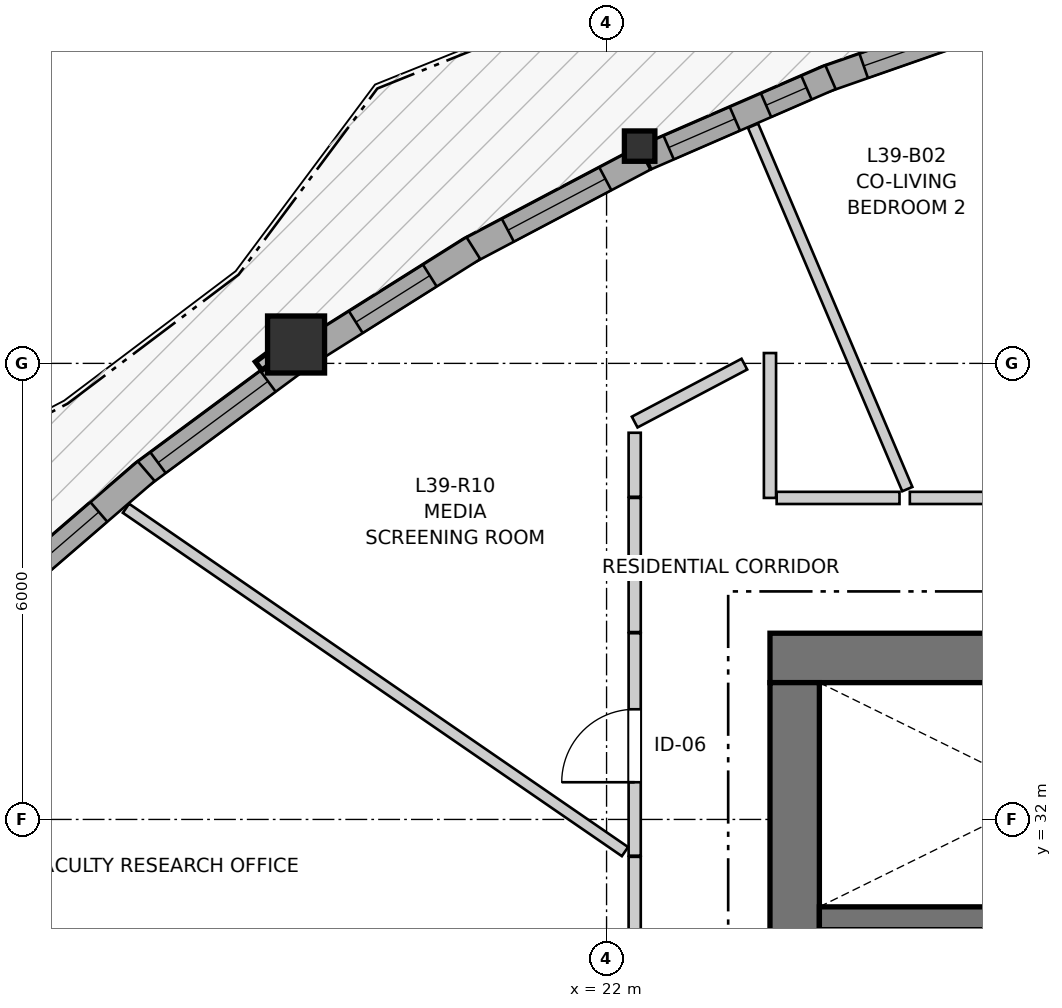
"""IFC4 building model, lengths in metres.
Left out: names, types, materials, properties, quantities, classifications, styles, units other than length and angle.
Written with IfcOpenShell. Run it as: python <this file> out.ifc"""

import sys

from ifc_helpers import new_model, si_unit, direction, frame, frame_2d, origin, origin_2d, place, context, subcontext, project, spatial, rectangle, i_section, extrude, source, transform, mapped, element, fill, save


model = new_model("IFC4")
c1 = context("Model", 3, precision=1e-05, world=origin(), true_north=direction((0.0, 1.0)))
c2 = subcontext(c1, "Body", "Model", "MODEL_VIEW")
j1 = project(units=[si_unit("LENGTHUNIT", "METRE"), si_unit("PLANEANGLEUNIT", "RADIAN")], contexts=[c1])
p1 = place(None, origin())
s1 = spatial("IfcSite", under=j1, at=p1, CompositionType="ELEMENT")
p2 = place(p1, origin())
s2 = spatial("IfcBuilding", under=s1, at=p2, CompositionType="ELEMENT")
p3 = place(p2, frame((0.0, 0.0, 133.0)))
s3 = spatial("IfcBuildingStorey", under=s2, at=p3, CompositionType="ELEMENT", Elevation=133.0)
p4 = place(p3, frame((36.55, 34.125, 0.0), z_axis=(0.0, 0.0, 1.0), x_axis=(-1.0, 0.0, 0.0)))
e1 = element("IfcWall", 1, at=p4, inside=s3, PredefinedType="SHEAR", context=c2, shape_type="SweptSolid", body=[
    extrude(rectangle(XDim=12.4, YDim=0.65, at=frame_2d((6.2, 0.0))), origin(), (0.0, 0.0, 1.0), 2.95),
])
p5 = place(p3, frame((24.475, 33.8, 0.0), z_axis=(0.0, 0.0, 1.0), x_axis=(0.0, -1.0, 0.0)))
e2 = element("IfcWall", 2, at=p5, inside=s3, PredefinedType="SHEAR", context=c2, shape_type="SweptSolid", body=[
    extrude(rectangle(XDim=15.6, YDim=0.65, at=frame_2d((7.8, 0.0))), origin(), (0.0, 0.0, 1.0), 2.95),
])
p6 = place(p5, frame((7.05, 0.0, 0.0)))
e3 = element("IfcOpeningElement", 3, at=p6, cuts=e2, PredefinedType="OPENING", context=c2, shape_type="SweptSolid", body=[
    extrude(rectangle(XDim=1.5, YDim=2.15, at=frame_2d((0.75, 1.075))), frame((0.0, 0.335, 0.0), z_axis=(0.0, -1.0, 0.0), x_axis=(1.0, 0.0, 0.0)), (0.0, 0.0, 1.0), 0.67),
])
p7 = place(p5, frame((3.52, 0.0, 0.0)))
e4 = element("IfcOpeningElement", 4, at=p7, cuts=e2, PredefinedType="OPENING", context=c2, shape_type="SweptSolid", body=[
    extrude(rectangle(XDim=0.86, YDim=2.05, at=frame_2d((0.43, 1.025))), frame((0.0, 0.335, 0.0), z_axis=(0.0, -1.0, 0.0), x_axis=(1.0, 0.0, 0.0)), (0.0, 0.0, 1.0), 0.67),
])
p8 = place(p5, frame((11.22, 0.0, 0.0)))
e5 = element("IfcOpeningElement", 5, at=p8, cuts=e2, PredefinedType="OPENING", context=c2, shape_type="SweptSolid", body=[
    extrude(rectangle(XDim=0.86, YDim=2.05, at=frame_2d((0.43, 1.025))), frame((0.0, 0.335, 0.0), z_axis=(0.0, -1.0, 0.0), x_axis=(1.0, 0.0, 0.0)), (0.0, 0.0, 1.0), 0.67),
])
p9 = place(p3, frame((24.8, 30.7, 0.0), z_axis=(0.0, 0.0, 1.0), x_axis=(1.0, 0.0, 0.0)))
e6 = element("IfcWall", 6, at=p9, inside=s3, PredefinedType="SHEAR", context=c2, shape_type="SweptSolid", body=[
    extrude(rectangle(XDim=11.1, YDim=0.3, at=frame_2d((5.55, 0.0))), origin(), (0.0, 0.0, 1.0), 2.95),
])
p10 = place(p9, frame((6.22, 0.0, 0.0)))
e7 = element("IfcOpeningElement", 7, at=p10, cuts=e6, PredefinedType="OPENING", context=c2, shape_type="SweptSolid", body=[
    extrude(rectangle(XDim=0.98, YDim=2.15, at=frame_2d((0.49, 1.075))), frame((0.0, 0.16, 0.0), z_axis=(0.0, -1.0, 0.0), x_axis=(1.0, 0.0, 0.0)), (0.0, 0.0, 1.0), 0.32),
])
p11 = place(p9, frame((9.15, 0.0, 0.0)))
e8 = element("IfcOpeningElement", 8, at=p11, cuts=e6, PredefinedType="OPENING", context=c2, shape_type="SweptSolid", body=[
    extrude(rectangle(XDim=1.15, YDim=2.15, at=frame_2d((0.575, 1.075))), frame((0.0, 0.16, 0.0), z_axis=(0.0, -1.0, 0.0), x_axis=(1.0, 0.0, 0.0)), (0.0, 0.0, 1.0), 0.32),
])
m1 = source(origin(), c2, "Body", "SweptSolid", [
    extrude(i_section(OverallWidth=0.401, OverallDepth=0.399, WebThickness=0.023, FlangeThickness=0.036, FilletRadius=0.015, at=origin_2d()), origin(), (0.0, 0.0, 1.0), 2.95),
])
p12 = place(p3, frame((22.435, 40.858, 0.0), z_axis=(0.0, 0.0, 1.0), x_axis=(1.0, 0.0, 0.0)))
e9 = element("IfcColumn", 9, at=p12, inside=s3, PredefinedType="PILASTER", context=c2, shape_type="MappedRepresentation", body=[
    mapped(m1, transform((0.0, 0.0, 0.0), x_axis=(1.0, 0.0, 0.0), y_axis=(0.0, 1.0, 0.0), z_axis=(0.0, 0.0, 1.0), scale=1.0)),
])
m2 = source(origin(), c2, "Body", "SweptSolid", [
    extrude(rectangle(XDim=0.75, YDim=0.75, at=origin_2d()), origin(), (0.0, 0.0, 1.0), 2.95),
])
p13 = place(p3, frame((17.915, 38.249, 0.0), z_axis=(0.0, 0.0, 1.0), x_axis=(1.0, 0.0, 0.0)))
e10 = element("IfcColumn", 10, at=p13, inside=s3, PredefinedType="COLUMN", context=c2, shape_type="MappedRepresentation", body=[
    mapped(m2, transform((0.0, 0.0, 0.0), x_axis=(1.0, 0.0, 0.0), y_axis=(0.0, 1.0, 0.0), z_axis=(0.0, 0.0, 1.0), scale=1.0)),
])
p14 = place(p3, frame((27.262, 42.57, 0.0), z_axis=(0.0, 0.0, 1.0), x_axis=(-0.944148723561, -0.329519631884, 0.0)))
e11 = element("IfcWall", 11, at=p14, inside=s3, PredefinedType="SOLIDWALL", context=c2, shape_type="SweptSolid", body=[
    extrude(rectangle(XDim=2.54, YDim=0.34, at=frame_2d((1.27, 0.0))), origin(), (0.0, 0.0, 1.0), 2.53),
])
p15 = place(p14, frame((0.54, 0.0, 0.82)))
e12 = element("IfcOpeningElement", 12, at=p15, cuts=e11, PredefinedType="OPENING", context=c2, shape_type="SweptSolid", body=[
    extrude(rectangle(XDim=1.45, YDim=1.25, at=frame_2d((0.725, 0.625))), frame((0.0, 0.18, 0.0), z_axis=(0.0, -1.0, 0.0), x_axis=(1.0, 0.0, 0.0)), (0.0, 0.0, 1.0), 0.36),
])
p16 = place(p3, frame((24.947, 41.765, 0.0), z_axis=(0.0, 0.0, 1.0), x_axis=(-0.917074459221, -0.398715984435, 0.0)))
e13 = element("IfcWall", 13, at=p16, inside=s3, PredefinedType="SOLIDWALL", context=c2, shape_type="SweptSolid", body=[
    extrude(rectangle(XDim=2.645, YDim=0.34, at=frame_2d((1.322, 0.0))), origin(), (0.0, 0.0, 1.0), 2.53),
])
p17 = place(p16, frame((0.344, 0.0, 0.82)))
e14 = element("IfcOpeningElement", 14, at=p17, cuts=e13, PredefinedType="OPENING", context=c2, shape_type="SweptSolid", body=[
    extrude(rectangle(XDim=0.58, YDim=1.35, at=frame_2d((0.29, 0.675))), frame((0.0, 0.18, 0.0), z_axis=(0.0, -1.0, 0.0), x_axis=(1.0, 0.0, 0.0)), (0.0, 0.0, 1.0), 0.36),
])
p18 = place(p16, frame((1.372, 0.0, 0.82)))
e15 = element("IfcOpeningElement", 15, at=p18, cuts=e13, PredefinedType="OPENING", context=c2, shape_type="SweptSolid", body=[
    extrude(rectangle(XDim=0.95, YDim=1.35, at=frame_2d((0.475, 0.675))), frame((0.0, 0.18, 0.0), z_axis=(0.0, -1.0, 0.0), x_axis=(1.0, 0.0, 0.0)), (0.0, 0.0, 1.0), 0.36),
])
p19 = place(p3, frame((22.497, 40.699, 0.0), z_axis=(0.0, 0.0, 1.0), x_axis=(-0.88439007496, -0.466748535415, 0.0)))
e16 = element("IfcWall", 16, at=p19, inside=s3, PredefinedType="SOLIDWALL", context=c2, shape_type="SweptSolid", body=[
    extrude(rectangle(XDim=2.63, YDim=0.34, at=frame_2d((1.315, 0.0))), origin(), (0.0, 0.0, 1.0), 2.53),
])
p20 = place(p19, frame((0.58, 0.0, 0.82)))
e17 = element("IfcOpeningElement", 17, at=p20, cuts=e16, PredefinedType="OPENING", context=c2, shape_type="SweptSolid", body=[
    extrude(rectangle(XDim=1.45, YDim=1.25, at=frame_2d((0.725, 0.625))), frame((0.0, 0.18, 0.0), z_axis=(0.0, -1.0, 0.0), x_axis=(1.0, 0.0, 0.0)), (0.0, 0.0, 1.0), 0.36),
])
p21 = place(p3, frame((20.248, 39.516, 0.0), z_axis=(0.0, 0.0, 1.0), x_axis=(-0.846438698205, -0.532486178394, 0.0)))
e18 = element("IfcWall", 18, at=p21, inside=s3, PredefinedType="SOLIDWALL", context=c2, shape_type="SweptSolid", body=[
    extrude(rectangle(XDim=2.495, YDim=0.34, at=frame_2d((1.247, 0.0))), origin(), (0.0, 0.0, 1.0), 2.53),
])
p22 = place(p21, frame((0.677, 0.0, 0.82)))
e19 = element("IfcOpeningElement", 19, at=p22, cuts=e18, PredefinedType="OPENING", context=c2, shape_type="SweptSolid", body=[
    extrude(rectangle(XDim=1.15, YDim=1.2, at=frame_2d((0.575, 0.6))), frame((0.0, 0.18, 0.0), z_axis=(0.0, -1.0, 0.0), x_axis=(1.0, 0.0, 0.0)), (0.0, 0.0, 1.0), 0.36),
])
p23 = place(p3, frame((17.891, 38.02, 0.0), z_axis=(0.0, 0.0, 1.0), x_axis=(-0.803824223013, -0.594866891411, 0.0)))
e20 = element("IfcWall", 20, at=p23, inside=s3, PredefinedType="SOLIDWALL", context=c2, shape_type="SweptSolid", body=[
    extrude(rectangle(XDim=2.51, YDim=0.34, at=frame_2d((1.255, 0.0))), origin(), (0.0, 0.0, 1.0), 2.53),
])
p24 = place(p23, frame((0.43, 0.0, 0.82)))
e21 = element("IfcOpeningElement", 21, at=p24, cuts=e20, PredefinedType="OPENING", context=c2, shape_type="SweptSolid", body=[
    extrude(rectangle(XDim=1.8, YDim=1.45, at=frame_2d((0.9, 0.725))), frame((0.0, 0.18, 0.0), z_axis=(0.0, -1.0, 0.0), x_axis=(1.0, 0.0, 0.0)), (0.0, 0.0, 1.0), 0.36),
])
p25 = place(p3, frame((15.943, 36.582, 0.0), z_axis=(0.0, 0.0, 1.0), x_axis=(-0.757520482063, -0.652811396389, 0.0)))
e22 = element("IfcWall", 22, at=p25, inside=s3, PredefinedType="SOLIDWALL", context=c2, shape_type="SweptSolid", body=[
    extrude(rectangle(XDim=2.674, YDim=0.34, at=frame_2d((1.337, 0.0))), origin(), (0.0, 0.0, 1.0), 2.53),
])
p26 = place(p25, frame((0.822, 0.0, 0.82)))
e23 = element("IfcOpeningElement", 23, at=p26, cuts=e22, PredefinedType="OPENING", context=c2, shape_type="SweptSolid", body=[
    extrude(rectangle(XDim=1.5, YDim=1.45, at=frame_2d((0.75, 0.725))), frame((0.0, 0.18, 0.0), z_axis=(0.0, -1.0, 0.0), x_axis=(1.0, 0.0, 0.0)), (0.0, 0.0, 1.0), 0.36),
])
p27 = place(p3, frame((25.99, 36.23, 0.0), z_axis=(0.0, 0.0, 1.0), x_axis=(1.0, 0.0, 0.0)))
e24 = element("IfcWall", 24, at=p27, inside=s3, PredefinedType="PARTITIONING", context=c2, shape_type="SweptSolid", body=[
    extrude(rectangle(XDim=4.073, YDim=0.16, at=frame_2d((2.037, 0.0))), origin(), (0.0, 0.0, 1.0), 2.95),
])
p28 = place(p27, frame((1.6, 0.0, 0.0)))
e25 = element("IfcOpeningElement", 25, at=p28, cuts=e24, PredefinedType="OPENING", context=c2, shape_type="SweptSolid", body=[
    extrude(rectangle(XDim=0.92, YDim=2.1, at=frame_2d((0.46, 1.05))), frame((0.0, 0.09, 0.0), z_axis=(0.0, -1.0, 0.0), x_axis=(1.0, 0.0, 0.0)), (0.0, 0.0, 1.0), 0.18),
])
p29 = place(p3, frame((22.37, 27.85, 0.0), z_axis=(0.0, 0.0, 1.0), x_axis=(0.0, 1.0, 0.0)))
e26 = element("IfcWall", 26, at=p29, inside=s3, PredefinedType="PARTITIONING", context=c2, shape_type="SweptSolid", body=[
    extrude(rectangle(XDim=3.658, YDim=0.16, at=frame_2d((1.829, 0.0))), origin(), (0.0, 0.0, 1.0), 2.95),
])
p30 = place(p29, frame((1.369, 0.0, 0.0)))
e27 = element("IfcOpeningElement", 27, at=p30, cuts=e26, PredefinedType="OPENING", context=c2, shape_type="SweptSolid", body=[
    extrude(rectangle(XDim=0.96, YDim=2.1, at=frame_2d((0.48, 1.05))), frame((0.0, 0.09, 0.0), z_axis=(0.0, -1.0, 0.0), x_axis=(1.0, 0.0, 0.0)), (0.0, 0.0, 1.0), 0.18),
])
p31 = place(p3, frame((22.37, 31.523, 0.0), z_axis=(0.0, 0.0, 1.0), x_axis=(0.0, 1.0, 0.0)))
e28 = element("IfcWall", 28, at=p31, inside=s3, PredefinedType="PARTITIONING", context=c2, shape_type="SweptSolid", body=[
    extrude(rectangle(XDim=2.927, YDim=0.16, at=frame_2d((1.463, 0.0))), origin(), (0.0, 0.0, 1.0), 2.95),
])
p32 = place(p31, frame((0.967, 0.0, 0.0)))
e29 = element("IfcOpeningElement", 29, at=p32, cuts=e28, PredefinedType="OPENING", context=c2, shape_type="SweptSolid", body=[
    extrude(rectangle(XDim=0.96, YDim=2.1, at=frame_2d((0.48, 1.05))), frame((0.0, 0.09, 0.0), z_axis=(0.0, -1.0, 0.0), x_axis=(1.0, 0.0, 0.0)), (0.0, 0.0, 1.0), 0.18),
])
p33 = place(p3, frame((15.677, 36.094, 0.0), z_axis=(0.0, 0.0, 1.0), x_axis=(0.823863992983, -0.566787544911, 0.0)))
e30 = element("IfcWall", 30, at=p33, inside=s3, PredefinedType="PARTITIONING", context=c2, shape_type="SweptSolid", body=[
    extrude(rectangle(XDim=7.969, YDim=0.145, at=frame_2d((3.984, 0.0))), origin(), (0.0, 0.0, 1.0), 2.95),
])
p34 = place(p3, frame((23.927, 41.127, 0.0), z_axis=(0.0, 0.0, 1.0), x_axis=(0.39073452171, -0.920503413108, 0.0)))
e31 = element("IfcWall", 31, at=p34, inside=s3, PredefinedType="PARTITIONING", context=c2, shape_type="SweptSolid", body=[
    extrude(rectangle(XDim=5.194, YDim=0.145, at=frame_2d((2.597, 0.0))), origin(), (0.0, 0.0, 1.0), 2.95),
])
p35 = place(p3, frame((24.15, 36.23, 0.0), z_axis=(0.0, 0.0, 1.0), x_axis=(0.0, 1.0, 0.0)))
e32 = element("IfcWall", 32, at=p35, inside=s3, PredefinedType="PARTITIONING", context=c2, shape_type="SweptSolid", body=[
    extrude(rectangle(XDim=1.906, YDim=0.16, at=frame_2d((0.953, 0.0))), origin(), (0.0, 0.0, 1.0), 2.95),
])
p36 = place(p3, frame((24.238, 36.23, 0.0), z_axis=(0.0, 0.0, 1.0), x_axis=(1.0, 0.0, 0.0)))
e33 = element("IfcWall", 33, at=p36, inside=s3, PredefinedType="PARTITIONING", context=c2, shape_type="SweptSolid", body=[
    extrude(rectangle(XDim=1.616, YDim=0.16, at=frame_2d((0.808, 0.0))), origin(), (0.0, 0.0, 1.0), 2.95),
])
p37 = place(p3, frame((22.37, 34.465, 0.0), z_axis=(0.0, 0.0, 1.0), x_axis=(0.0, 1.0, 0.0)))
e34 = element("IfcWall", 34, at=p37, inside=s3, PredefinedType="PARTITIONING", context=c2, shape_type="SweptSolid", body=[
    extrude(rectangle(XDim=1.765, YDim=0.16, at=frame_2d((0.882, 0.0))), origin(), (0.0, 0.0, 1.0), 2.95),
])
p38 = place(p3, frame((22.37, 37.228, 0.0), z_axis=(0.0, 0.0, 1.0), x_axis=(0.884271493782, 0.466973152638, 0.0)))
e35 = element("IfcWall", 35, at=p38, inside=s3, PredefinedType="PARTITIONING", context=c2, shape_type="SweptSolid", body=[
    extrude(rectangle(XDim=1.632, YDim=0.16, at=frame_2d((0.816, 0.0))), origin(), (0.0, 0.0, 1.0), 2.558),
])
p39 = place(p3, frame((22.37, 36.245, 0.0), z_axis=(0.0, 0.0, 1.0), x_axis=(0.0, 1.0, 0.0)))
e36 = element("IfcWall", 36, at=p39, inside=s3, PredefinedType="PARTITIONING", context=c2, shape_type="SweptSolid", body=[
    extrude(rectangle(XDim=0.842, YDim=0.16, at=frame_2d((0.421, 0.0))), origin(), (0.0, 0.0, 1.0), 2.95),
])
m3 = source(origin(), c2, "Body", "SweptSolid", [
    extrude(rectangle(XDim=1.45, YDim=1.25, at=frame_2d((0.725, 0.625))), frame((0.0, 0.03, 0.0), z_axis=(0.0, -1.0, 0.0), x_axis=(1.0, 0.0, 0.0)), (0.0, 0.0, 1.0), 0.06),
])
p40 = place(p15, origin())
e37 = element("IfcWindow", 37, at=p40, inside=s3, PartitioningType="SINGLE_PANEL", PredefinedType="WINDOW", context=c2, shape_type="MappedRepresentation", body=[
    mapped(m3, transform((0.0, 0.0, 0.0), x_axis=(1.0, 0.0, 0.0), y_axis=(0.0, 1.0, 0.0), z_axis=(0.0, 0.0, 1.0), scale=1.0)),
])
fill(e12, e37)
m4 = source(origin(), c2, "Body", "SweptSolid", [
    extrude(rectangle(XDim=0.58, YDim=1.35, at=frame_2d((0.29, 0.675))), frame((0.0, 0.03, 0.0), z_axis=(0.0, -1.0, 0.0), x_axis=(1.0, 0.0, 0.0)), (0.0, 0.0, 1.0), 0.06),
])
p41 = place(p17, origin())
e38 = element("IfcWindow", 38, at=p41, inside=s3, PartitioningType="SINGLE_PANEL", PredefinedType="WINDOW", context=c2, shape_type="MappedRepresentation", body=[
    mapped(m4, transform((0.0, 0.0, 0.0), x_axis=(1.0, 0.0, 0.0), y_axis=(0.0, 1.0, 0.0), z_axis=(0.0, 0.0, 1.0), scale=1.0)),
])
fill(e14, e38)
m5 = source(origin(), c2, "Body", "SweptSolid", [
    extrude(rectangle(XDim=0.95, YDim=1.35, at=frame_2d((0.475, 0.675))), frame((0.0, 0.03, 0.0), z_axis=(0.0, -1.0, 0.0), x_axis=(1.0, 0.0, 0.0)), (0.0, 0.0, 1.0), 0.06),
])
p42 = place(p18, origin())
e39 = element("IfcWindow", 39, at=p42, inside=s3, PartitioningType="SINGLE_PANEL", PredefinedType="WINDOW", context=c2, shape_type="MappedRepresentation", body=[
    mapped(m5, transform((0.0, 0.0, 0.0), x_axis=(1.0, 0.0, 0.0), y_axis=(0.0, 1.0, 0.0), z_axis=(0.0, 0.0, 1.0), scale=1.0)),
])
fill(e15, e39)
p43 = place(p20, origin())
e40 = element("IfcWindow", 40, at=p43, inside=s3, PartitioningType="SINGLE_PANEL", PredefinedType="WINDOW", context=c2, shape_type="MappedRepresentation", body=[
    mapped(m3, transform((0.0, 0.0, 0.0), x_axis=(1.0, 0.0, 0.0), y_axis=(0.0, 1.0, 0.0), z_axis=(0.0, 0.0, 1.0), scale=1.0)),
])
fill(e17, e40)
m6 = source(origin(), c2, "Body", "SweptSolid", [
    extrude(rectangle(XDim=1.15, YDim=1.2, at=frame_2d((0.575, 0.6))), frame((0.0, 0.03, 0.0), z_axis=(0.0, -1.0, 0.0), x_axis=(1.0, 0.0, 0.0)), (0.0, 0.0, 1.0), 0.06),
])
p44 = place(p22, origin())
e41 = element("IfcWindow", 41, at=p44, inside=s3, PartitioningType="SINGLE_PANEL", PredefinedType="WINDOW", context=c2, shape_type="MappedRepresentation", body=[
    mapped(m6, transform((0.0, 0.0, 0.0), x_axis=(1.0, 0.0, 0.0), y_axis=(0.0, 1.0, 0.0), z_axis=(0.0, 0.0, 1.0), scale=1.0)),
])
fill(e19, e41)
m7 = source(origin(), c2, "Body", "SweptSolid", [
    extrude(rectangle(XDim=1.8, YDim=1.45, at=frame_2d((0.9, 0.725))), frame((0.0, 0.03, 0.0), z_axis=(0.0, -1.0, 0.0), x_axis=(1.0, 0.0, 0.0)), (0.0, 0.0, 1.0), 0.06),
])
p45 = place(p24, origin())
e42 = element("IfcWindow", 42, at=p45, inside=s3, PartitioningType="SINGLE_PANEL", PredefinedType="WINDOW", context=c2, shape_type="MappedRepresentation", body=[
    mapped(m7, transform((0.0, 0.0, 0.0), x_axis=(1.0, 0.0, 0.0), y_axis=(0.0, 1.0, 0.0), z_axis=(0.0, 0.0, 1.0), scale=1.0)),
])
fill(e21, e42)
m8 = source(origin(), c2, "Body", "SweptSolid", [
    extrude(rectangle(XDim=1.5, YDim=1.45, at=frame_2d((0.75, 0.725))), frame((0.0, 0.03, 0.0), z_axis=(0.0, -1.0, 0.0), x_axis=(1.0, 0.0, 0.0)), (0.0, 0.0, 1.0), 0.06),
])
p46 = place(p26, origin())
e43 = element("IfcWindow", 43, at=p46, inside=s3, PartitioningType="SINGLE_PANEL", PredefinedType="WINDOW", context=c2, shape_type="MappedRepresentation", body=[
    mapped(m8, transform((0.0, 0.0, 0.0), x_axis=(1.0, 0.0, 0.0), y_axis=(0.0, 1.0, 0.0), z_axis=(0.0, 0.0, 1.0), scale=1.0)),
])
fill(e23, e43)
m9 = source(origin(), c2, "Body", "SweptSolid", [
    extrude(rectangle(XDim=0.96, YDim=2.1, at=frame_2d((0.48, 1.05))), frame((0.0, 0.025, 0.0), z_axis=(0.0, -1.0, 0.0), x_axis=(1.0, 0.0, 0.0)), (0.0, 0.0, 1.0), 0.05),
])
p47 = place(p32, origin())
e44 = element("IfcDoor", 44, at=p47, inside=s3, OperationType="SINGLE_SWING_LEFT", PredefinedType="DOOR", context=c2, shape_type="MappedRepresentation", body=[
    mapped(m9, transform((0.0, 0.0, 0.0), x_axis=(1.0, 0.0, 0.0), y_axis=(0.0, 1.0, 0.0), z_axis=(0.0, 0.0, 1.0), scale=1.0)),
])
fill(e29, e44)
save(model, sys.argv[1])
